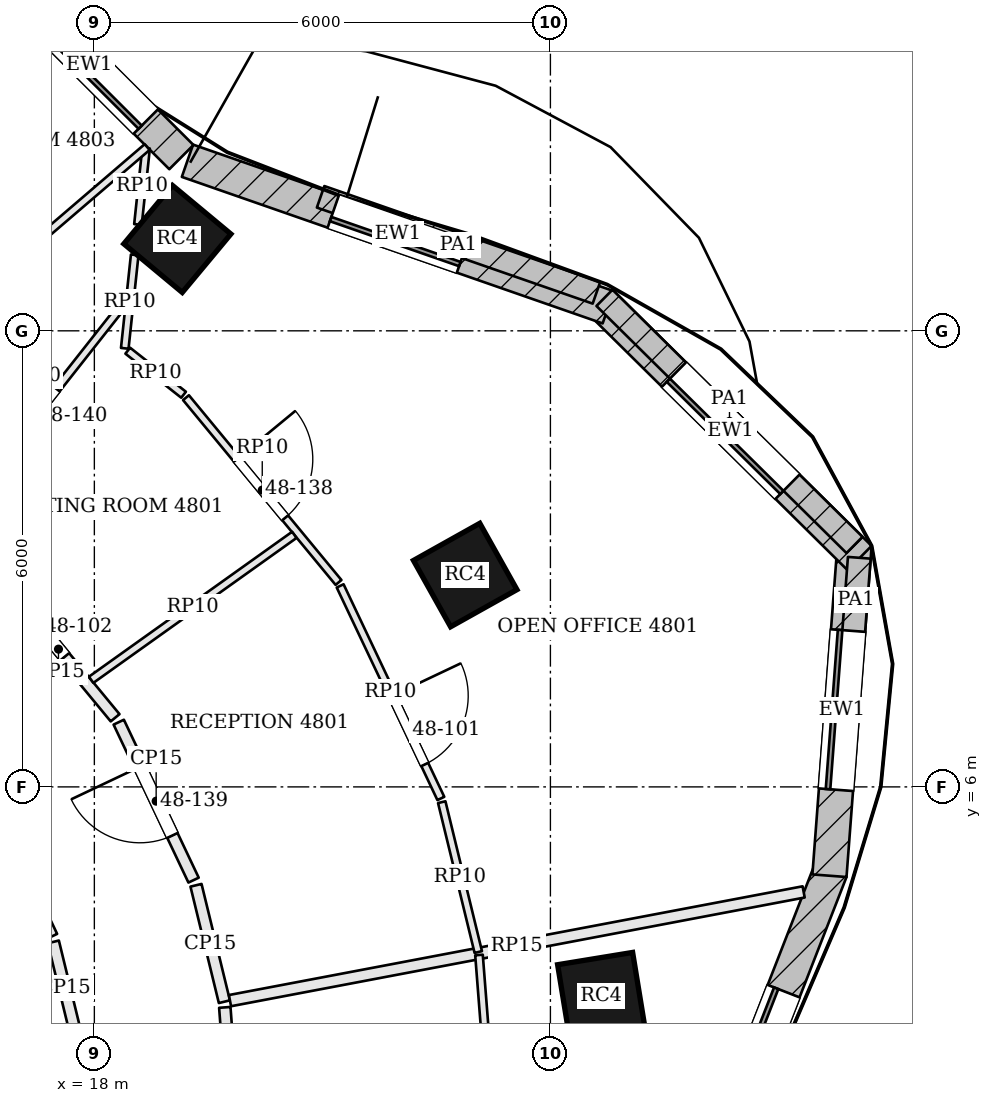
"""IFC4 building model, lengths in metres.
Left out: names, types, materials, properties, quantities, classifications, styles, units other than length and angle.
Written with IfcOpenShell. Run it as: python <this file> out.ifc"""

import sys

from ifc_helpers import new_model, si_unit, direction, frame, frame_2d, origin, origin_2d, place, context, subcontext, project, spatial, rectangle, extrude, element, fill, save


model = new_model("IFC4")
c1 = context("Model", 3, precision=1e-05, world=origin(), true_north=direction((0.0, 1.0)))
c2 = subcontext(c1, "Body", "Model", "MODEL_VIEW")
j1 = project(units=[si_unit("LENGTHUNIT", "METRE"), si_unit("PLANEANGLEUNIT", "RADIAN")], contexts=[c1])
p1 = place(None, origin())
s1 = spatial("IfcSite", under=j1, at=p1, CompositionType="ELEMENT")
p2 = place(p1, origin())
s2 = spatial("IfcBuilding", under=s1, at=p2, CompositionType="ELEMENT")
p3 = place(p2, frame((0.0, 0.0, 197.4)))
s3 = spatial("IfcBuildingStorey", under=s2, at=p3, CompositionType="ELEMENT", Elevation=197.4)
for number, where, z_axis, x_axis in (
    (1, (24.669, 3.248, 0.0), (0.0, 0.0, 1.0), (-0.162, 0.987, 0.0)),
    (2, (22.879, 8.787, 0.0), (0.0, 0.0, 1.0), (-0.489, 0.873, 0.0)),
    (3, (19.092, 13.209, 0.0), (0.0, 0.0, 1.0), (-0.769, 0.639, 0.0)),
):
    element("IfcColumn", number, at=place(p3, frame(where, z_axis=z_axis, x_axis=x_axis)), inside=s3, PredefinedType="COLUMN", context=c2, shape_type="SweptSolid", body=[
        extrude(rectangle(XDim=1.0, YDim=1.0, at=origin_2d()), origin(), (0.0, 0.0, 1.0), 3.9),
    ])
p4 = place(p3, frame((25.687, -0.226, 0.0), z_axis=(0.0, 0.0, 1.0), x_axis=(0.363500194409, 0.931594122279, 0.0)))
e4 = element("IfcWall", 4, at=p4, inside=s3, PredefinedType="SOLIDWALL", context=c2, shape_type="SweptSolid", body=[
    extrude(rectangle(XDim=5.499, YDim=0.45, at=frame_2d((2.75, 0.0))), origin(), (0.0, 0.0, 1.0), 3.7),
])
p5 = place(p4, frame((1.699, 0.0, 0.9)))
e5 = element("IfcOpeningElement", 5, at=p5, cuts=e4, PredefinedType="OPENING", context=c2, shape_type="SweptSolid", body=[
    extrude(rectangle(XDim=2.1, YDim=2.3, at=frame_2d((1.05, 1.15))), frame((0.0, 0.235, 0.0), z_axis=(0.0, -1.0, 0.0), x_axis=(1.0, 0.0, 0.0)), (0.0, 0.0, 1.0), 0.47),
])
p6 = place(p3, frame((27.671, 4.831, 0.0), z_axis=(0.0, 0.0, 1.0), x_axis=(0.075658122047, 0.997133816781, 0.0)))
e6 = element("IfcWall", 6, at=p6, inside=s3, PredefinedType="SOLIDWALL", context=c2, shape_type="SweptSolid", body=[
    extrude(rectangle(XDim=4.369, YDim=0.45, at=frame_2d((2.185, 0.0))), origin(), (0.0, 0.0, 1.0), 3.7),
])
p7 = place(p6, frame((1.135, 0.0, 0.9)))
e7 = element("IfcOpeningElement", 7, at=p7, cuts=e6, PredefinedType="OPENING", context=c2, shape_type="SweptSolid", body=[
    extrude(rectangle(XDim=2.1, YDim=2.3, at=frame_2d((1.05, 1.15))), frame((0.0, 0.235, 0.0), z_axis=(0.0, -1.0, 0.0), x_axis=(1.0, 0.0, 0.0)), (0.0, 0.0, 1.0), 0.47),
])
p8 = place(p3, frame((28.068, 9.011, 0.0), z_axis=(0.0, 0.0, 1.0), x_axis=(-0.711293453435, 0.702895172199, 0.0)))
e8 = element("IfcWall", 8, at=p8, inside=s3, PredefinedType="SOLIDWALL", context=c2, shape_type="SweptSolid", body=[
    extrude(rectangle(XDim=4.768, YDim=0.45, at=frame_2d((2.384, 0.0))), origin(), (0.0, 0.0, 1.0), 3.7),
])
p9 = place(p8, frame((1.334, 0.0, 0.9)))
e9 = element("IfcOpeningElement", 9, at=p9, cuts=e8, PredefinedType="OPENING", context=c2, shape_type="SweptSolid", body=[
    extrude(rectangle(XDim=2.1, YDim=2.3, at=frame_2d((1.05, 1.15))), frame((0.0, 0.235, 0.0), z_axis=(0.0, -1.0, 0.0), x_axis=(1.0, 0.0, 0.0)), (0.0, 0.0, 1.0), 0.47),
])
p10 = place(p3, frame((24.761, 12.31, 0.0), z_axis=(0.0, 0.0, 1.0), x_axis=(-0.944397305248, 0.328806523414, 0.0)))
e10 = element("IfcWall", 10, at=p10, inside=s3, PredefinedType="SOLIDWALL", context=c2, shape_type="SweptSolid", body=[
    extrude(rectangle(XDim=5.862, YDim=0.45, at=frame_2d((2.931, 0.0))), origin(), (0.0, 0.0, 1.0), 3.7),
])
p11 = place(p10, frame((2.031, 0.0, 0.9)))
e11 = element("IfcOpeningElement", 11, at=p11, cuts=e10, PredefinedType="OPENING", context=c2, shape_type="SweptSolid", body=[
    extrude(rectangle(XDim=1.8, YDim=2.3, at=frame_2d((0.9, 1.15))), frame((0.0, 0.235, 0.0), z_axis=(0.0, -1.0, 0.0), x_axis=(1.0, 0.0, 0.0)), (0.0, 0.0, 1.0), 0.47),
])
p12 = place(p3, frame((19.145, 14.285, 0.0), z_axis=(0.0, 0.0, 1.0), x_axis=(-0.707427521052, 0.706785895769, 0.0)))
e12 = element("IfcWall", 12, at=p12, inside=s3, PredefinedType="SOLIDWALL", context=c2, shape_type="SweptSolid", body=[
    extrude(rectangle(XDim=3.425, YDim=0.45, at=frame_2d((1.712, 0.0))), origin(), (0.0, 0.0, 1.0), 3.7),
])
p13 = place(p12, frame((0.662, 0.0, 0.9)))
e13 = element("IfcOpeningElement", 13, at=p13, cuts=e12, PredefinedType="OPENING", context=c2, shape_type="SweptSolid", body=[
    extrude(rectangle(XDim=2.1, YDim=2.3, at=frame_2d((1.05, 1.15))), frame((0.0, 0.235, 0.0), z_axis=(0.0, -1.0, 0.0), x_axis=(1.0, 0.0, 0.0)), (0.0, 0.0, 1.0), 0.47),
])
p14 = place(p3, frame((27.979, 7.892, 3.9), z_axis=(0.0, 0.0, 1.0), x_axis=(0.075750382553, 0.997126812167, 0.0)))
e14 = element("IfcWall", 14, at=p14, inside=s3, PredefinedType="PARAPET", context=c2, shape_type="SweptSolid", body=[
    extrude(rectangle(XDim=1.125, YDim=0.3, at=frame_2d((0.562, 0.0))), origin(), (0.0, 0.0, 1.0), 1.1),
])
p15 = place(p3, frame((28.0, 9.183, 3.9), z_axis=(0.0, 0.0, 1.0), x_axis=(-0.711291435321, 0.702897214419, 0.0)))
e15 = element("IfcWall", 15, at=p15, inside=s3, PredefinedType="PARAPET", context=c2, shape_type="SweptSolid", body=[
    extrude(rectangle(XDim=4.625, YDim=0.3, at=frame_2d((2.312, 0.0))), origin(), (0.0, 0.0, 1.0), 1.1),
])
p16 = place(p3, frame((24.605, 12.5, 3.9), z_axis=(0.0, 0.0, 1.0), x_axis=(-0.944373295981, 0.328875474668, 0.0)))
e16 = element("IfcWall", 16, at=p16, inside=s3, PredefinedType="PARAPET", context=c2, shape_type="SweptSolid", body=[
    extrude(rectangle(XDim=3.842, YDim=0.3, at=frame_2d((1.921, 0.0))), origin(), (0.0, 0.0, 1.0), 1.1),
])
p17 = place(p3, frame((19.711, 3.174, 0.0), z_axis=(0.0, 0.0, 1.0), x_axis=(-0.236809994688, 0.971555982132, 0.0)))
e17 = element("IfcWall", 17, at=p17, inside=s3, PredefinedType="PARTITIONING", context=c2, shape_type="SweptSolid", body=[
    extrude(rectangle(XDim=1.576, YDim=0.15, at=frame_2d((0.788, 0.0))), origin(), (0.0, 0.0, 1.0), 3.084),
])
p18 = place(p3, frame((19.305, 4.773, 0.0), z_axis=(0.0, 0.0, 1.0), x_axis=(-0.428173054138, 0.903696760927, 0.0)))
e18 = element("IfcWall", 18, at=p18, inside=s3, PredefinedType="PARTITIONING", context=c2, shape_type="SweptSolid", body=[
    extrude(rectangle(XDim=2.3, YDim=0.15, at=frame_2d((1.15, 0.0))), origin(), (0.0, 0.0, 1.0), 3.084),
])
p19 = place(p18, frame((0.65, 0.0, 0.0)))
e19 = element("IfcOpeningElement", 19, at=p19, cuts=e18, PredefinedType="OPENING", context=c2, shape_type="SweptSolid", body=[
    extrude(rectangle(XDim=1.0, YDim=2.1, at=frame_2d((0.5, 1.05))), frame((0.0, 0.085, 0.0), z_axis=(0.0, -1.0, 0.0), x_axis=(1.0, 0.0, 0.0)), (0.0, 0.0, 1.0), 0.17),
])
p20 = place(p3, frame((18.273, 6.909, 0.0), z_axis=(0.0, 0.0, 1.0), x_axis=(-0.63653648943, 0.771246586783, 0.0)))
e20 = element("IfcWall", 20, at=p20, inside=s3, PredefinedType="PARTITIONING", context=c2, shape_type="SweptSolid", body=[
    extrude(rectangle(XDim=2.342, YDim=0.15, at=frame_2d((1.171, 0.0))), origin(), (0.0, 0.0, 1.0), 3.084),
])
p21 = place(p20, frame((1.041, 0.0, 0.0)))
e21 = element("IfcOpeningElement", 21, at=p21, cuts=e20, PredefinedType="OPENING", context=c2, shape_type="SweptSolid", body=[
    extrude(rectangle(XDim=1.0, YDim=2.4, at=frame_2d((0.5, 1.2))), frame((0.0, 0.085, 0.0), z_axis=(0.0, -1.0, 0.0), x_axis=(1.0, 0.0, 0.0)), (0.0, 0.0, 1.0), 0.17),
])
p22 = place(p3, frame((27.332, 4.618, 0.0), z_axis=(0.0, 0.0, 1.0), x_axis=(-0.982508687951, -0.186216750322, 0.0)))
e22 = element("IfcWall", 22, at=p22, inside=s3, PredefinedType="PARTITIONING", context=c2, shape_type="SweptSolid", body=[
    extrude(rectangle(XDim=7.681, YDim=0.15, at=frame_2d((3.841, 0.0))), origin(), (0.0, 0.0, 1.0), 3.084),
])
p23 = place(p3, frame((19.943, 0.075, 0.0), z_axis=(0.0, 0.0, 1.0), x_axis=(-0.074781943541, 0.997199910209, 0.0)))
e23 = element("IfcWall", 23, at=p23, inside=s3, PredefinedType="PARTITIONING", context=c2, shape_type="SweptSolid", body=[
    extrude(rectangle(XDim=3.033, YDim=0.15, at=frame_2d((1.517, 0.0))), origin(), (0.0, 0.0, 1.0), 3.084),
])
p24 = place(p3, frame((16.652, 5.702, 0.0), z_axis=(0.0, 0.0, 1.0), x_axis=(0.428126129773, -0.903718992279, 0.0)))
e24 = element("IfcWall", 24, at=p24, inside=s3, PredefinedType="PARTITIONING", context=c2, shape_type="SweptSolid", body=[
    extrude(rectangle(XDim=1.846, YDim=0.15, at=frame_2d((0.923, 0.0))), origin(), (0.0, 0.0, 1.0), 3.084),
])
p25 = place(p3, frame((17.46, 3.961, 0.0), z_axis=(0.0, 0.0, 1.0), x_axis=(0.236655249498, -0.971593687137, 0.0)))
e25 = element("IfcWall", 25, at=p25, inside=s3, PredefinedType="PARTITIONING", context=c2, shape_type="SweptSolid", body=[
    extrude(rectangle(XDim=1.251, YDim=0.15, at=frame_2d((0.626, 0.0))), origin(), (0.0, 0.0, 1.0), 3.084),
])
p26 = place(p3, frame((18.681, 14.404, 0.0), z_axis=(0.0, 0.0, 1.0), x_axis=(-0.106080909628, -0.994357501411, 0.0)))
e26 = element("IfcWall", 26, at=p26, inside=s3, PredefinedType="PARTITIONING", context=c2, shape_type="SweptSolid", body=[
    extrude(rectangle(XDim=1.01, YDim=0.1, at=frame_2d((0.505, 0.0))), origin(), (0.0, 0.0, 1.0), 3.084),
])
p27 = place(p3, frame((18.531, 12.999, 0.0), z_axis=(0.0, 0.0, 1.0), x_axis=(-0.106031141527, -0.994362809555, 0.0)))
e27 = element("IfcWall", 27, at=p27, inside=s3, PredefinedType="PARTITIONING", context=c2, shape_type="SweptSolid", body=[
    extrude(rectangle(XDim=1.237, YDim=0.1, at=frame_2d((0.618, 0.0))), origin(), (0.0, 0.0, 1.0), 3.084),
])
p28 = place(p3, frame((18.439, 11.739, 0.0), z_axis=(0.0, 0.0, 1.0), x_axis=(0.784976275707, -0.619525823979, 0.0)))
e28 = element("IfcWall", 28, at=p28, inside=s3, PredefinedType="PARTITIONING", context=c2, shape_type="SweptSolid", body=[
    extrude(rectangle(XDim=0.936, YDim=0.1, at=frame_2d((0.468, 0.0))), origin(), (0.0, 0.0, 1.0), 3.084),
])
p29 = place(p3, frame((19.206, 11.121, 0.0), z_axis=(0.0, 0.0, 1.0), x_axis=(0.636597206989, -0.771196470462, 0.0)))
e29 = element("IfcWall", 29, at=p29, inside=s3, PredefinedType="PARTITIONING", context=c2, shape_type="SweptSolid", body=[
    extrude(rectangle(XDim=3.152, YDim=0.1, at=frame_2d((1.576, 0.0))), origin(), (0.0, 0.0, 1.0), 3.084),
])
p30 = place(p29, frame((1.05, 0.0, 0.0)))
e30 = element("IfcOpeningElement", 30, at=p30, cuts=e29, PredefinedType="OPENING", context=c2, shape_type="SweptSolid", body=[
    extrude(rectangle(XDim=1.0, YDim=2.4, at=frame_2d((0.5, 1.2))), frame((0.0, 0.06, 0.0), z_axis=(0.0, -1.0, 0.0), x_axis=(1.0, 0.0, 0.0)), (0.0, 0.0, 1.0), 0.12),
])
p31 = place(p3, frame((21.234, 8.644, 0.0), z_axis=(0.0, 0.0, 1.0), x_axis=(0.428147386965, -0.903708921631, 0.0)))
e31 = element("IfcWall", 31, at=p31, inside=s3, PredefinedType="PARTITIONING", context=c2, shape_type="SweptSolid", body=[
    extrude(rectangle(XDim=3.095, YDim=0.1, at=frame_2d((1.547, 0.0))), origin(), (0.0, 0.0, 1.0), 3.084),
])
p32 = place(p31, frame((1.6, 0.0, 0.0)))
e32 = element("IfcOpeningElement", 32, at=p32, cuts=e31, PredefinedType="OPENING", context=c2, shape_type="SweptSolid", body=[
    extrude(rectangle(XDim=1.0, YDim=2.1, at=frame_2d((0.5, 1.05))), frame((0.0, 0.06, 0.0), z_axis=(0.0, -1.0, 0.0), x_axis=(1.0, 0.0, 0.0)), (0.0, 0.0, 1.0), 0.12),
])
p33 = place(p3, frame((22.57, 5.799, 0.0), z_axis=(0.0, 0.0, 1.0), x_axis=(0.236756773089, -0.971568952981, 0.0)))
e33 = element("IfcWall", 33, at=p33, inside=s3, PredefinedType="PARTITIONING", context=c2, shape_type="SweptSolid", body=[
    extrude(rectangle(XDim=2.029, YDim=0.1, at=frame_2d((1.015, 0.0))), origin(), (0.0, 0.0, 1.0), 3.084),
])
p34 = place(p3, frame((17.958, 7.409, 0.0), z_axis=(0.0, 0.0, 1.0), x_axis=(0.814074945817, 0.58075983211, 0.0)))
e34 = element("IfcWall", 34, at=p34, inside=s3, PredefinedType="PARTITIONING", context=c2, shape_type="SweptSolid", body=[
    extrude(rectangle(XDim=3.284, YDim=0.1, at=frame_2d((1.642, 0.0))), origin(), (0.0, 0.0, 1.0), 3.084),
])
p35 = place(p3, frame((16.049, 9.389, 0.0), z_axis=(0.0, 0.0, 1.0), x_axis=(0.619061036151, 0.785342876405, 0.0)))
e35 = element("IfcWall", 35, at=p35, inside=s3, PredefinedType="PARTITIONING", context=c2, shape_type="SweptSolid", body=[
    extrude(rectangle(XDim=3.747, YDim=0.1, at=frame_2d((1.874, 0.0))), origin(), (0.0, 0.0, 1.0), 3.084),
])
p36 = place(p35, frame((1.45, 0.0, 0.0)))
e36 = element("IfcOpeningElement", 36, at=p36, cuts=e35, PredefinedType="OPENING", context=c2, shape_type="SweptSolid", body=[
    extrude(rectangle(XDim=0.9, YDim=2.1, at=frame_2d((0.45, 1.05))), frame((0.0, 0.06, 0.0), z_axis=(0.0, -1.0, 0.0), x_axis=(1.0, 0.0, 0.0)), (0.0, 0.0, 1.0), 0.12),
])
p37 = place(p3, frame((15.049, 11.292, 0.0), z_axis=(0.0, 0.0, 1.0), x_axis=(0.759202764933, 0.650854178536, 0.0)))
e37 = element("IfcWall", 37, at=p37, inside=s3, PredefinedType="PARTITIONING", context=c2, shape_type="SweptSolid", body=[
    extrude(rectangle(XDim=4.802, YDim=0.1, at=frame_2d((2.401, 0.0))), origin(), (0.0, 0.0, 1.0), 3.084),
])
p38 = place(p3, frame((23.06, 3.789, 0.0), z_axis=(0.0, 0.0, 1.0), x_axis=(0.077993427123, -0.996953873219, 0.0)))
e38 = element("IfcWall", 38, at=p38, inside=s3, PredefinedType="PARTITIONING", context=c2, shape_type="SweptSolid", body=[
    extrude(rectangle(XDim=3.8, YDim=0.1, at=frame_2d((1.9, 0.0))), origin(), (0.0, 0.0, 1.0), 3.084),
])
p39 = place(p38, frame((1.799, 0.0, 0.0)))
e39 = element("IfcOpeningElement", 39, at=p39, cuts=e38, PredefinedType="OPENING", context=c2, shape_type="SweptSolid", body=[
    extrude(rectangle(XDim=0.9, YDim=2.1, at=frame_2d((0.45, 1.05))), frame((0.0, 0.06, 0.0), z_axis=(0.0, -1.0, 0.0), x_axis=(1.0, 0.0, 0.0)), (0.0, 0.0, 1.0), 0.12),
])
p40 = place(p5, origin())
e40 = element("IfcWindow", 40, at=p40, inside=s3, PartitioningType="SINGLE_PANEL", PredefinedType="WINDOW", context=c2, shape_type="SweptSolid", body=[
    extrude(rectangle(XDim=2.1, YDim=2.3, at=frame_2d((1.05, 1.15))), frame((0.0, 0.135, 0.0), z_axis=(0.0, -1.0, 0.0), x_axis=(1.0, 0.0, 0.0)), (0.0, 0.0, 1.0), 0.06),
])
fill(e5, e40)
p41 = place(p7, origin())
e41 = element("IfcWindow", 41, at=p41, inside=s3, PartitioningType="SINGLE_PANEL", PredefinedType="WINDOW", context=c2, shape_type="SweptSolid", body=[
    extrude(rectangle(XDim=2.1, YDim=2.3, at=frame_2d((1.05, 1.15))), frame((0.0, 0.135, 0.0), z_axis=(0.0, -1.0, 0.0), x_axis=(1.0, 0.0, 0.0)), (0.0, 0.0, 1.0), 0.06),
])
fill(e7, e41)
p42 = place(p9, origin())
e42 = element("IfcWindow", 42, at=p42, inside=s3, PartitioningType="SINGLE_PANEL", PredefinedType="WINDOW", context=c2, shape_type="SweptSolid", body=[
    extrude(rectangle(XDim=2.1, YDim=2.3, at=frame_2d((1.05, 1.15))), frame((0.0, 0.135, 0.0), z_axis=(0.0, -1.0, 0.0), x_axis=(1.0, 0.0, 0.0)), (0.0, 0.0, 1.0), 0.06),
])
fill(e9, e42)
p43 = place(p11, origin())
e43 = element("IfcWindow", 43, at=p43, inside=s3, PartitioningType="SINGLE_PANEL", PredefinedType="WINDOW", context=c2, shape_type="SweptSolid", body=[
    extrude(rectangle(XDim=1.8, YDim=2.3, at=frame_2d((0.9, 1.15))), frame((0.0, 0.135, 0.0), z_axis=(0.0, -1.0, 0.0), x_axis=(1.0, 0.0, 0.0)), (0.0, 0.0, 1.0), 0.06),
])
fill(e11, e43)
p44 = place(p13, origin())
e44 = element("IfcWindow", 44, at=p44, inside=s3, PartitioningType="SINGLE_PANEL", PredefinedType="WINDOW", context=c2, shape_type="SweptSolid", body=[
    extrude(rectangle(XDim=2.1, YDim=2.3, at=frame_2d((1.05, 1.15))), frame((0.0, 0.135, 0.0), z_axis=(0.0, -1.0, 0.0), x_axis=(1.0, 0.0, 0.0)), (0.0, 0.0, 1.0), 0.06),
])
fill(e13, e44)
p45 = place(p32, origin())
e45 = element("IfcDoor", 45, at=p45, inside=s3, OperationType="SINGLE_SWING_LEFT", PredefinedType="DOOR", context=c2, shape_type="SweptSolid", body=[
    extrude(rectangle(XDim=1.0, YDim=2.1, at=frame_2d((0.5, 1.05))), frame((0.0, 0.025, 0.0), z_axis=(0.0, -1.0, 0.0), x_axis=(1.0, 0.0, 0.0)), (0.0, 0.0, 1.0), 0.05),
])
fill(e32, e45)
p46 = place(p21, origin())
e46 = element("IfcDoor", 46, at=p46, inside=s3, OperationType="SINGLE_SWING_RIGHT", PredefinedType="DOOR", context=c2, shape_type="SweptSolid", body=[
    extrude(rectangle(XDim=1.0, YDim=2.4, at=frame_2d((0.5, 1.2))), frame((0.0, 0.025, 0.0), z_axis=(0.0, -1.0, 0.0), x_axis=(1.0, 0.0, 0.0)), (0.0, 0.0, 1.0), 0.05),
])
fill(e21, e46)
p47 = place(p30, origin())
e47 = element("IfcDoor", 47, at=p47, inside=s3, OperationType="SINGLE_SWING_LEFT", PredefinedType="DOOR", context=c2, shape_type="SweptSolid", body=[
    extrude(rectangle(XDim=1.0, YDim=2.4, at=frame_2d((0.5, 1.2))), frame((0.0, 0.025, 0.0), z_axis=(0.0, -1.0, 0.0), x_axis=(1.0, 0.0, 0.0)), (0.0, 0.0, 1.0), 0.05),
])
fill(e30, e47)
p48 = place(p19, origin())
e48 = element("IfcDoor", 48, at=p48, inside=s3, OperationType="SINGLE_SWING_RIGHT", PredefinedType="DOOR", context=c2, shape_type="SweptSolid", body=[
    extrude(rectangle(XDim=1.0, YDim=2.1, at=frame_2d((0.5, 1.05))), frame((0.0, 0.025, 0.0), z_axis=(0.0, -1.0, 0.0), x_axis=(1.0, 0.0, 0.0)), (0.0, 0.0, 1.0), 0.05),
])
fill(e19, e48)
p49 = place(p36, origin())
e49 = element("IfcDoor", 49, at=p49, inside=s3, OperationType="SINGLE_SWING_LEFT", PredefinedType="DOOR", context=c2, shape_type="SweptSolid", body=[
    extrude(rectangle(XDim=0.9, YDim=2.1, at=frame_2d((0.45, 1.05))), frame((0.0, 0.025, 0.0), z_axis=(0.0, -1.0, 0.0), x_axis=(1.0, 0.0, 0.0)), (0.0, 0.0, 1.0), 0.05),
])
fill(e36, e49)
save(model, sys.argv[1])
